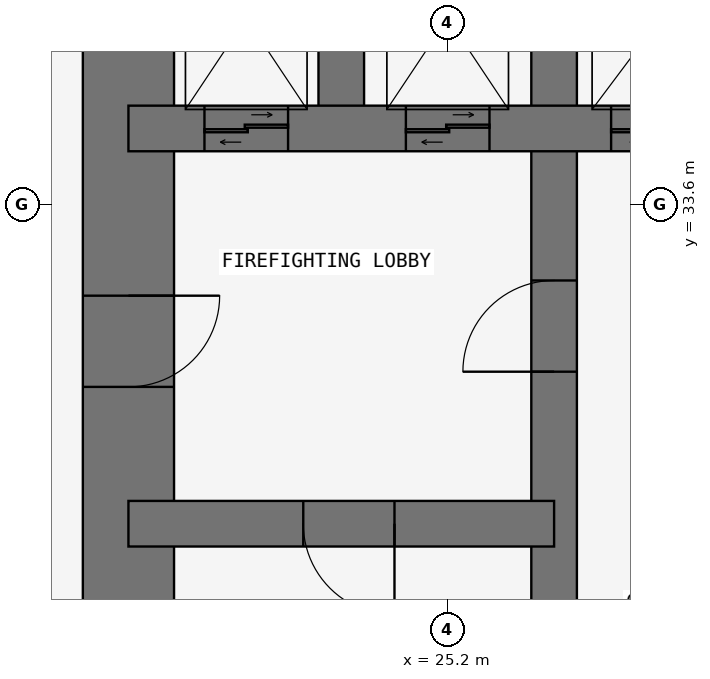
"""IFC4 building model, lengths in metres.
Left out: names, types, materials, properties, quantities, classifications, styles, units other than length and angle.
Written with IfcOpenShell. Run it as: python <this file> out.ifc"""

import sys

from ifc_helpers import new_model, si_unit, direction, frame, frame_2d, origin, place, context, subcontext, project, spatial, rectangle, extrude, element, fill, save


model = new_model("IFC4")
c1 = context("Model", 3, precision=1e-05, world=origin(), true_north=direction((0.0, 1.0)))
c2 = subcontext(c1, "Body", "Model", "MODEL_VIEW")
j1 = project(units=[si_unit("LENGTHUNIT", "METRE"), si_unit("PLANEANGLEUNIT", "RADIAN")], contexts=[c1])
p1 = place(None, origin())
s1 = spatial("IfcSite", under=j1, at=p1, CompositionType="ELEMENT")
p2 = place(p1, origin())
s2 = spatial("IfcBuilding", under=s1, at=p2, CompositionType="ELEMENT")
p3 = place(p2, frame((0.0, 0.0, 108.9)))
s3 = spatial("IfcBuildingStorey", under=s2, at=p3, CompositionType="ELEMENT", Elevation=108.9)
p4 = place(p3, frame((21.0, 37.8, 0.0), z_axis=(0.0, 0.0, 1.0), x_axis=(0.0, -1.0, 0.0)))
e1 = element("IfcWall", 1, at=p4, inside=s3, PredefinedType="SHEAR", context=c2, shape_type="SweptSolid", body=[
    extrude(rectangle(XDim=17.4, YDim=1.2, at=frame_2d((8.7, 0.0))), origin(), (0.0, 0.0, 1.0), 3.6),
])
p5 = place(p4, frame((5.4, 0.0, 0.0)))
e2 = element("IfcOpeningElement", 2, at=p5, cuts=e1, PredefinedType="OPENING", context=c2, shape_type="SweptSolid", body=[
    extrude(rectangle(XDim=1.2, YDim=2.1, at=frame_2d((0.6, 1.05))), frame((0.0, 0.61, 0.0), z_axis=(0.0, -1.0, 0.0), x_axis=(1.0, 0.0, 0.0)), (0.0, 0.0, 1.0), 1.22),
])
p6 = place(p3, frame((26.6, 21.0, 0.0), z_axis=(0.0, 0.0, 1.0), x_axis=(0.0, 1.0, 0.0)))
e3 = element("IfcWall", 3, at=p6, inside=s3, PredefinedType="SHEAR", context=c2, shape_type="SweptSolid", body=[
    extrude(rectangle(XDim=16.8, YDim=0.6, at=frame_2d((8.4, 0.0))), origin(), (0.0, 0.0, 1.0), 3.6),
])
p7 = place(p6, frame((10.4, 0.0, 0.0)))
e4 = element("IfcOpeningElement", 4, at=p7, cuts=e3, PredefinedType="OPENING", context=c2, shape_type="SweptSolid", body=[
    extrude(rectangle(XDim=1.2, YDim=2.1, at=frame_2d((0.6, 1.05))), frame((0.0, 0.31, 0.0), z_axis=(0.0, -1.0, 0.0), x_axis=(1.0, 0.0, 0.0)), (0.0, 0.0, 1.0), 0.62),
])
p8 = place(p3, frame((21.0, 29.4, 0.0), z_axis=(0.0, 0.0, 1.0), x_axis=(1.0, 0.0, 0.0)))
e5 = element("IfcWall", 5, at=p8, inside=s3, PredefinedType="SHEAR", context=c2, shape_type="SweptSolid", body=[
    extrude(rectangle(XDim=5.6, YDim=0.6, at=frame_2d((2.8, 0.0))), origin(), (0.0, 0.0, 1.0), 3.6),
])
p9 = place(p8, frame((2.3, 0.0, 0.0)))
e6 = element("IfcOpeningElement", 6, at=p9, cuts=e5, PredefinedType="OPENING", context=c2, shape_type="SweptSolid", body=[
    extrude(rectangle(XDim=1.2, YDim=2.1, at=frame_2d((0.6, 1.05))), frame((0.0, 0.31, 0.0), z_axis=(0.0, -1.0, 0.0), x_axis=(1.0, 0.0, 0.0)), (0.0, 0.0, 1.0), 0.62),
])
p10 = place(p3, frame((21.0, 34.6, 0.0), z_axis=(0.0, 0.0, 1.0), x_axis=(1.0, 0.0, 0.0)))
e7 = element("IfcWall", 7, at=p10, inside=s3, PredefinedType="SHEAR", context=c2, shape_type="SweptSolid", body=[
    extrude(rectangle(XDim=11.2, YDim=0.6, at=frame_2d((5.6, 0.0))), origin(), (0.0, 0.0, 1.0), 3.6),
])
p11 = place(p10, frame((9.35, 0.0, 0.0)))
e8 = element("IfcOpeningElement", 8, at=p11, cuts=e7, PredefinedType="OPENING", context=c2, shape_type="SweptSolid", body=[
    extrude(rectangle(XDim=0.9, YDim=2.1, at=frame_2d((0.45, 1.05))), frame((0.0, 0.31, 0.0), z_axis=(0.0, -1.0, 0.0), x_axis=(1.0, 0.0, 0.0)), (0.0, 0.0, 1.0), 0.62),
])
p12 = place(p10, frame((1.0, 0.0, 0.0)))
e9 = element("IfcOpeningElement", 9, at=p12, cuts=e7, PredefinedType="OPENING", context=c2, shape_type="SweptSolid", body=[
    extrude(rectangle(XDim=1.1, YDim=2.1, at=frame_2d((0.55, 1.05))), frame((0.0, 0.31, 0.0), z_axis=(0.0, -1.0, 0.0), x_axis=(1.0, 0.0, 0.0)), (0.0, 0.0, 1.0), 0.62),
])
p13 = place(p10, frame((3.65, 0.0, 0.0)))
e10 = element("IfcOpeningElement", 10, at=p13, cuts=e7, PredefinedType="OPENING", context=c2, shape_type="SweptSolid", body=[
    extrude(rectangle(XDim=1.1, YDim=2.1, at=frame_2d((0.55, 1.05))), frame((0.0, 0.31, 0.0), z_axis=(0.0, -1.0, 0.0), x_axis=(1.0, 0.0, 0.0)), (0.0, 0.0, 1.0), 0.62),
])
p14 = place(p10, frame((6.35, 0.0, 0.0)))
e11 = element("IfcOpeningElement", 11, at=p14, cuts=e7, PredefinedType="OPENING", context=c2, shape_type="SweptSolid", body=[
    extrude(rectangle(XDim=1.3, YDim=2.1, at=frame_2d((0.65, 1.05))), frame((0.0, 0.31, 0.0), z_axis=(0.0, -1.0, 0.0), x_axis=(1.0, 0.0, 0.0)), (0.0, 0.0, 1.0), 0.62),
])
p15 = place(p3, frame((23.8, 34.6, 0.0), z_axis=(0.0, 0.0, 1.0), x_axis=(0.0, 1.0, 0.0)))
e12 = element("IfcWall", 12, at=p15, inside=s3, PredefinedType="SHEAR", context=c2, shape_type="SweptSolid", body=[
    extrude(rectangle(XDim=3.2, YDim=0.6, at=frame_2d((1.6, 0.0))), origin(), (0.0, 0.0, 1.0), 3.6),
])
p16 = place(p5, origin())
e13 = element("IfcDoor", 13, at=p16, inside=s3, OperationType="SINGLE_SWING_LEFT", PredefinedType="DOOR", context=c2, shape_type="SweptSolid", body=[
    extrude(rectangle(XDim=1.2, YDim=2.1, at=frame_2d((0.6, 1.05))), frame((0.0, 0.025, 0.0), z_axis=(0.0, -1.0, 0.0), x_axis=(1.0, 0.0, 0.0)), (0.0, 0.0, 1.0), 0.05),
])
fill(e2, e13)
p17 = place(p9, frame((1.2, 0.0, 0.0), z_axis=(0.0, 0.0, 1.0), x_axis=(-1.0, 0.0, 0.0)))
e14 = element("IfcDoor", 14, at=p17, inside=s3, OperationType="SINGLE_SWING_LEFT", PredefinedType="DOOR", context=c2, shape_type="SweptSolid", body=[
    extrude(rectangle(XDim=1.2, YDim=2.1, at=frame_2d((0.6, 1.05))), frame((0.0, 0.025, 0.0), z_axis=(0.0, -1.0, 0.0), x_axis=(1.0, 0.0, 0.0)), (0.0, 0.0, 1.0), 0.05),
])
fill(e6, e14)
p18 = place(p7, origin())
e15 = element("IfcDoor", 15, at=p18, inside=s3, OperationType="SINGLE_SWING_LEFT", PredefinedType="DOOR", context=c2, shape_type="SweptSolid", body=[
    extrude(rectangle(XDim=1.2, YDim=2.1, at=frame_2d((0.6, 1.05))), frame((0.0, 0.025, 0.0), z_axis=(0.0, -1.0, 0.0), x_axis=(1.0, 0.0, 0.0)), (0.0, 0.0, 1.0), 0.05),
])
fill(e4, e15)
p19 = place(p12, origin())
e16 = element("IfcDoor", 16, at=p19, inside=s3, OperationType="DOUBLE_DOOR_SLIDING", PredefinedType="DOOR", context=c2, shape_type="SweptSolid", body=[
    extrude(rectangle(XDim=1.1, YDim=2.1, at=frame_2d((0.55, 1.05))), frame((0.0, 0.025, 0.0), z_axis=(0.0, -1.0, 0.0), x_axis=(1.0, 0.0, 0.0)), (0.0, 0.0, 1.0), 0.05),
])
fill(e9, e16)
p20 = place(p13, origin())
e17 = element("IfcDoor", 17, at=p20, inside=s3, OperationType="DOUBLE_DOOR_SLIDING", PredefinedType="DOOR", context=c2, shape_type="SweptSolid", body=[
    extrude(rectangle(XDim=1.1, YDim=2.1, at=frame_2d((0.55, 1.05))), frame((0.0, 0.025, 0.0), z_axis=(0.0, -1.0, 0.0), x_axis=(1.0, 0.0, 0.0)), (0.0, 0.0, 1.0), 0.05),
])
fill(e10, e17)
p21 = place(p14, origin())
e18 = element("IfcDoor", 18, at=p21, inside=s3, OperationType="DOUBLE_DOOR_SLIDING", PredefinedType="DOOR", context=c2, shape_type="SweptSolid", body=[
    extrude(rectangle(XDim=1.3, YDim=2.1, at=frame_2d((0.65, 1.05))), frame((0.0, 0.025, 0.0), z_axis=(0.0, -1.0, 0.0), x_axis=(1.0, 0.0, 0.0)), (0.0, 0.0, 1.0), 0.05),
])
fill(e11, e18)
save(model, sys.argv[1])
